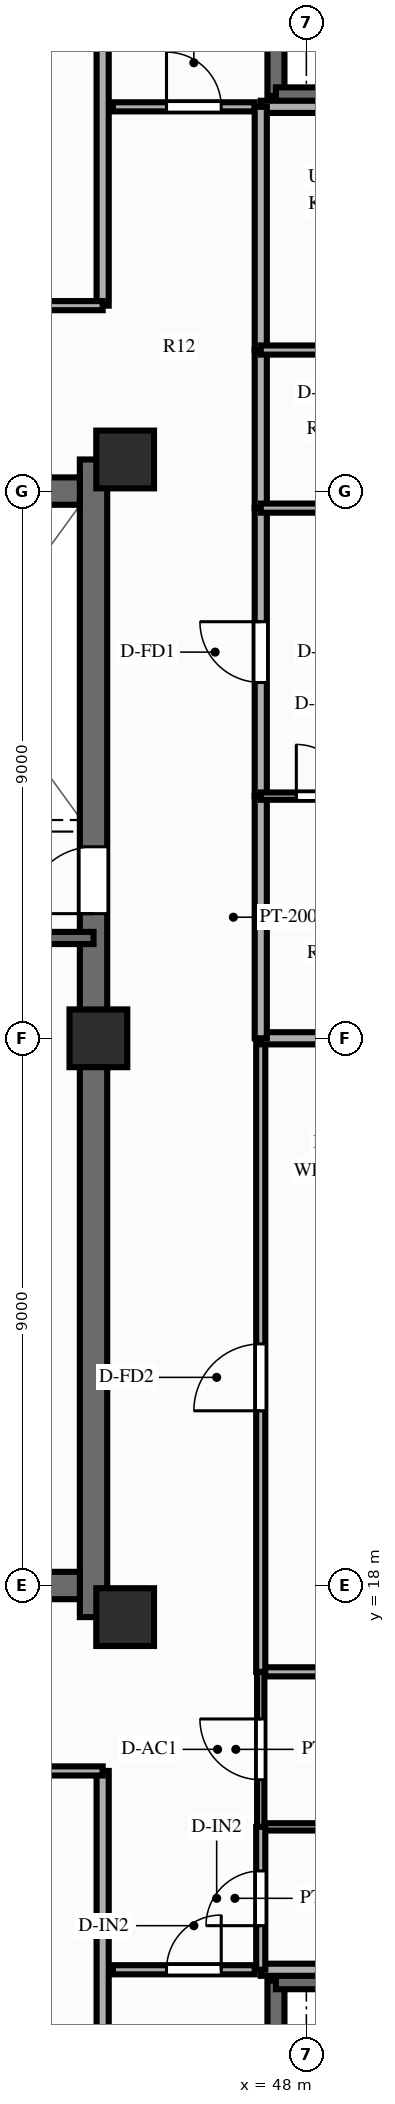
"""IFC4 building model, lengths in metres.
Left out: names, types, materials, properties, quantities, classifications, styles, units other than length and angle.
Written with IfcOpenShell. Run it as: python <this file> out.ifc"""

import sys

from ifc_helpers import new_model, si_unit, direction, frame, frame_2d, origin, origin_2d, place, context, subcontext, project, spatial, rectangle, extrude, source, transform, mapped, element, fill, save


model = new_model("IFC4")
c1 = context("Model", 3, precision=1e-05, world=origin(), true_north=direction((0.0, 1.0)))
c2 = subcontext(c1, "Body", "Model", "MODEL_VIEW")
j1 = project(units=[si_unit("LENGTHUNIT", "METRE"), si_unit("PLANEANGLEUNIT", "RADIAN")], contexts=[c1])
p1 = place(None, origin())
s1 = spatial("IfcSite", under=j1, at=p1, CompositionType="ELEMENT")
p2 = place(p1, origin())
s2 = spatial("IfcBuilding", under=s1, at=p2, CompositionType="ELEMENT")
p3 = place(p2, frame((0.0, 0.0, 249.0)))
s3 = spatial("IfcBuildingStorey", under=s2, at=p3, CompositionType="ELEMENT", Elevation=249.0)
p4 = place(p3, frame((44.5, 17.48, 0.0), z_axis=(0.0, 0.0, 1.0), x_axis=(0.0, 1.0, 0.0)))
e1 = element("IfcWall", 1, at=p4, inside=s3, PredefinedType="SHEAR", context=c2, shape_type="SweptSolid", body=[
    extrude(rectangle(XDim=19.04, YDim=0.45, at=frame_2d((9.52, 0.0))), origin(), (0.0, 0.0, 1.0), 3.2),
])
p5 = place(p4, frame((12.67, 0.0, 0.0), z_axis=(0.0, 0.0, 1.0), x_axis=(-1.0, 0.0, 0.0)))
e2 = element("IfcOpeningElement", 2, at=p5, cuts=e1, PredefinedType="OPENING", context=c2, shape_type="SweptSolid", body=[
    extrude(rectangle(XDim=1.1, YDim=2.15, at=frame_2d((0.55, 1.075))), frame((0.0, 0.237, 0.0), z_axis=(0.0, -1.0, 0.0), x_axis=(1.0, 0.0, 0.0)), (0.0, 0.0, 1.0), 0.474),
])
p6 = place(p3, frame((31.725, 18.0, 0.0), z_axis=(0.0, 0.0, 1.0), x_axis=(1.0, 0.0, 0.0)))
e3 = element("IfcWall", 3, at=p6, inside=s3, PredefinedType="SHEAR", context=c2, shape_type="SweptSolid", body=[
    extrude(rectangle(XDim=12.55, YDim=0.45, at=frame_2d((6.275, 0.0))), origin(), (0.0, 0.0, 1.0), 3.2),
])
p7 = place(p3, frame((31.725, 36.0, 0.0), z_axis=(0.0, 0.0, 1.0), x_axis=(1.0, 0.0, 0.0)))
e4 = element("IfcWall", 4, at=p7, inside=s3, PredefinedType="SHEAR", context=c2, shape_type="SweptSolid", body=[
    extrude(rectangle(XDim=12.55, YDim=0.45, at=frame_2d((6.275, 0.0))), origin(), (0.0, 0.0, 1.0), 3.2),
])
p8 = place(p7, frame((5.225, 0.0, 0.0), z_axis=(0.0, 0.0, 1.0), x_axis=(-1.0, 0.0, 0.0)))
e5 = element("IfcOpeningElement", 5, at=p8, cuts=e4, PredefinedType="OPENING", context=c2, shape_type="SweptSolid", body=[
    extrude(rectangle(XDim=1.4, YDim=2.15, at=frame_2d((0.7, 1.075))), frame((0.0, 0.237, 0.0), z_axis=(0.0, -1.0, 0.0), x_axis=(1.0, 0.0, 0.0)), (0.0, 0.0, 1.0), 0.474),
])
m1 = source(origin(), c2, "Body", "SweptSolid", [
    extrude(rectangle(XDim=0.95, YDim=0.95, at=origin_2d()), origin(), (0.0, 0.0, 1.0), 3.2),
])
for number, where, z_axis, x_axis in (
    (6, (45.02, 17.48, 0.0), (0.0, 0.0, 1.0), (1.0, 0.0, 0.0)),
    (7, (45.02, 36.52, 0.0), (0.0, 0.0, 1.0), (1.0, 0.0, 0.0)),
    (8, (44.58, 27.0, 0.0), (0.0, 0.0, 1.0), (1.0, 0.0, 0.0)),
):
    element("IfcColumn", number, at=place(p3, frame(where, z_axis=z_axis, x_axis=x_axis)), inside=s3, PredefinedType="COLUMN", context=c2, shape_type="MappedRepresentation", body=[
        mapped(m1, transform((0.0, 0.0, 0.0), scale=1.0)),
    ])
for number, where, z_axis, x_axis in (
    (9, (47.5, 6.08, 0.0), (0.0, 0.0, 1.0), (0.0, 1.0, 0.0)),
    (10, (47.5, 11.5, 0.0), (0.0, 0.0, 1.0), (1.0, 0.0, 0.0)),
    (11, (47.5, 42.5, 0.0), (0.0, 0.0, 1.0), (0.0, 1.0, 0.0)),
    (12, (47.5, 42.5, 0.0), (0.0, 0.0, 1.0), (1.0, 0.0, 0.0)),
):
    element("IfcWall", number, at=place(p3, frame(where, z_axis=z_axis, x_axis=x_axis)), inside=s3, PredefinedType="SOLIDWALL", context=c2, shape_type="SweptSolid", body=[
        extrude(rectangle(XDim=5.42, YDim=0.28, at=frame_2d((2.71, 0.0))), origin(), (0.0, 0.0, 1.0), 2.48),
    ])
p9 = place(p3, frame((40.57, 28.65, 0.0), z_axis=(0.0, 0.0, 1.0), x_axis=(1.0, 0.0, 0.0)))
e13 = element("IfcWall", 13, at=p9, inside=s3, PredefinedType="SOLIDWALL", context=c2, shape_type="SweptSolid", body=[
    extrude(rectangle(XDim=3.93, YDim=0.2, at=frame_2d((1.965, 0.0))), origin(), (0.0, 0.0, 1.0), 2.88),
])
p10 = place(p3, frame((44.82, 11.68, 0.0), z_axis=(0.0, 0.0, 1.0), x_axis=(1.0, 0.0, 0.0)))
e14 = element("IfcWall", 14, at=p10, inside=s3, PredefinedType="PARTITIONING", context=c2, shape_type="SweptSolid", body=[
    extrude(rectangle(XDim=2.33, YDim=0.15, at=frame_2d((1.165, 0.0))), origin(), (0.0, 0.0, 1.0), 2.88),
])
p11 = place(p10, frame((0.88, 0.0, 0.0)))
e15 = element("IfcOpeningElement", 15, at=p11, cuts=e14, PredefinedType="OPENING", context=c2, shape_type="SweptSolid", body=[
    extrude(rectangle(XDim=0.9, YDim=2.1, at=frame_2d((0.45, 1.05))), frame((0.0, 0.087, 0.0), z_axis=(0.0, -1.0, 0.0), x_axis=(1.0, 0.0, 0.0)), (0.0, 0.0, 1.0), 0.174),
])
p12 = place(p3, frame((44.82, 42.32, 0.0), z_axis=(0.0, 0.0, 1.0), x_axis=(1.0, 0.0, 0.0)))
e16 = element("IfcWall", 16, at=p12, inside=s3, PredefinedType="PARTITIONING", context=c2, shape_type="SweptSolid", body=[
    extrude(rectangle(XDim=2.33, YDim=0.15, at=frame_2d((1.165, 0.0))), origin(), (0.0, 0.0, 1.0), 2.88),
])
p13 = place(p12, frame((0.88, 0.0, 0.0)))
e17 = element("IfcOpeningElement", 17, at=p13, cuts=e16, PredefinedType="OPENING", context=c2, shape_type="SweptSolid", body=[
    extrude(rectangle(XDim=0.9, YDim=2.1, at=frame_2d((0.45, 1.05))), frame((0.0, 0.087, 0.0), z_axis=(0.0, -1.0, 0.0), x_axis=(1.0, 0.0, 0.0)), (0.0, 0.0, 1.0), 0.174),
])
p14 = place(p3, frame((44.65, 14.95, 0.0), z_axis=(0.0, 0.0, 1.0), x_axis=(0.0, -1.0, 0.0)))
e18 = element("IfcWall", 18, at=p14, inside=s3, PredefinedType="PARTITIONING", context=c2, shape_type="SweptSolid", body=[
    extrude(rectangle(XDim=8.8, YDim=0.2, at=frame_2d((4.4, 0.0))), origin(), (0.0, 0.0, 1.0), 2.59),
])
p15 = place(p3, frame((38.266, 14.95, 0.0), z_axis=(0.0, 0.0, 1.0), x_axis=(1.0, 0.0, 0.0)))
e19 = element("IfcWall", 19, at=p15, inside=s3, PredefinedType="PARTITIONING", context=c2, shape_type="SweptSolid", body=[
    extrude(rectangle(XDim=6.384, YDim=0.15, at=frame_2d((3.192, 0.0))), origin(), (0.0, 0.0, 1.0), 2.88),
])
p16 = place(p15, frame((2.642, 0.0, 0.0)))
e20 = element("IfcOpeningElement", 20, at=p16, cuts=e19, PredefinedType="OPENING", context=c2, shape_type="SweptSolid", body=[
    extrude(rectangle(XDim=1.1, YDim=2.15, at=frame_2d((0.55, 1.075))), frame((0.0, 0.087, 0.0), z_axis=(0.0, -1.0, 0.0), x_axis=(1.0, 0.0, 0.0)), (0.0, 0.0, 1.0), 0.174),
])
p17 = place(p3, frame((44.65, 39.05, 0.0), z_axis=(0.0, 0.0, 1.0), x_axis=(0.0, 1.0, 0.0)))
e21 = element("IfcWall", 21, at=p17, inside=s3, PredefinedType="PARTITIONING", context=c2, shape_type="SweptSolid", body=[
    extrude(rectangle(XDim=8.8, YDim=0.2, at=frame_2d((4.4, 0.0))), origin(), (0.0, 0.0, 1.0), 2.59),
])
p18 = place(p3, frame((38.852, 39.05, 0.0), z_axis=(0.0, 0.0, 1.0), x_axis=(1.0, 0.0, 0.0)))
e22 = element("IfcWall", 22, at=p18, inside=s3, PredefinedType="PARTITIONING", context=c2, shape_type="SweptSolid", body=[
    extrude(rectangle(XDim=5.798, YDim=0.15, at=frame_2d((2.899, 0.0))), origin(), (0.0, 0.0, 1.0), 2.88),
])
p19 = place(p18, frame((2.349, 0.0, 0.0)))
e23 = element("IfcOpeningElement", 23, at=p19, cuts=e22, PredefinedType="OPENING", context=c2, shape_type="SweptSolid", body=[
    extrude(rectangle(XDim=1.1, YDim=2.15, at=frame_2d((0.55, 1.075))), frame((0.0, 0.087, 0.0), z_axis=(0.0, -1.0, 0.0), x_axis=(1.0, 0.0, 0.0)), (0.0, 0.0, 1.0), 0.174),
])
for number, where, z_axis, x_axis in (
    (24, (47.25, 11.68, 0.0), (0.0, 0.0, 1.0), (1.0, 0.0, 0.0)),
    (25, (47.25, 42.32, 0.0), (0.0, 0.0, 1.0), (1.0, 0.0, 0.0)),
):
    element("IfcWall", number, at=place(p3, frame(where, z_axis=z_axis, x_axis=x_axis)), inside=s3, PredefinedType="PARTITIONING", context=c2, shape_type="SweptSolid", body=[
        extrude(rectangle(XDim=5.6, YDim=0.2, at=frame_2d((2.8, 0.0))), origin(), (0.0, 0.0, 1.0), 2.88),
    ])
p20 = place(p3, frame((47.25, 14.03, 0.0), z_axis=(0.0, 0.0, 1.0), x_axis=(1.0, 0.0, 0.0)))
e26 = element("IfcWall", 26, at=p20, inside=s3, PredefinedType="PARTITIONING", context=c2, shape_type="SweptSolid", body=[
    extrude(rectangle(XDim=3.6, YDim=0.12, at=frame_2d((1.8, 0.0))), origin(), (0.0, 0.0, 1.0), 2.88),
])
p21 = place(p3, frame((47.25, 16.58, 0.0), z_axis=(0.0, 0.0, 1.0), x_axis=(1.0, 0.0, 0.0)))
e27 = element("IfcWall", 27, at=p21, inside=s3, PredefinedType="PARTITIONING", context=c2, shape_type="SweptSolid", body=[
    extrude(rectangle(XDim=3.6, YDim=0.15, at=frame_2d((1.8, 0.0))), origin(), (0.0, 0.0, 1.0), 2.88),
])
p22 = place(p3, frame((47.25, 11.68, 0.0), z_axis=(0.0, 0.0, 1.0), x_axis=(0.0, 1.0, 0.0)))
e28 = element("IfcWall", 28, at=p22, inside=s3, PredefinedType="PARTITIONING", context=c2, shape_type="SweptSolid", body=[
    extrude(rectangle(XDim=2.35, YDim=0.15, at=frame_2d((1.175, 0.0))), origin(), (0.0, 0.0, 1.0), 2.88),
])
p23 = place(p22, frame((0.725, 0.0, 0.0)))
e29 = element("IfcOpeningElement", 29, at=p23, cuts=e28, PredefinedType="OPENING", context=c2, shape_type="SweptSolid", body=[
    extrude(rectangle(XDim=0.9, YDim=2.1, at=frame_2d((0.45, 1.05))), frame((0.0, 0.087, 0.0), z_axis=(0.0, -1.0, 0.0), x_axis=(1.0, 0.0, 0.0)), (0.0, 0.0, 1.0), 0.174),
])
p24 = place(p3, frame((47.25, 14.03, 0.0), z_axis=(0.0, 0.0, 1.0), x_axis=(0.0, 1.0, 0.0)))
e30 = element("IfcWall", 30, at=p24, inside=s3, PredefinedType="PARTITIONING", context=c2, shape_type="SweptSolid", body=[
    extrude(rectangle(XDim=2.55, YDim=0.12, at=frame_2d((1.275, 0.0))), origin(), (0.0, 0.0, 1.0), 2.88),
])
p25 = place(p24, frame((0.775, 0.0, 0.0)))
e31 = element("IfcOpeningElement", 31, at=p25, cuts=e30, PredefinedType="OPENING", context=c2, shape_type="SweptSolid", body=[
    extrude(rectangle(XDim=1.0, YDim=2.1, at=frame_2d((0.5, 1.05))), frame((0.0, 0.072, 0.0), z_axis=(0.0, -1.0, 0.0), x_axis=(1.0, 0.0, 0.0)), (0.0, 0.0, 1.0), 0.144),
])
p26 = place(p3, frame((47.25, 16.58, 0.0), z_axis=(0.0, 0.0, 1.0), x_axis=(0.0, 1.0, 0.0)))
e32 = element("IfcWall", 32, at=p26, inside=s3, PredefinedType="PARTITIONING", context=c2, shape_type="SweptSolid", body=[
    extrude(rectangle(XDim=10.42, YDim=0.15, at=frame_2d((5.21, 0.0))), origin(), (0.0, 0.0, 1.0), 2.88),
])
p27 = place(p26, frame((4.293, 0.0, 0.0)))
e33 = element("IfcOpeningElement", 33, at=p27, cuts=e32, PredefinedType="OPENING", context=c2, shape_type="SweptSolid", body=[
    extrude(rectangle(XDim=1.1, YDim=2.15, at=frame_2d((0.55, 1.075))), frame((0.0, 0.087, 0.0), z_axis=(0.0, -1.0, 0.0), x_axis=(1.0, 0.0, 0.0)), (0.0, 0.0, 1.0), 0.174),
])
p28 = place(p3, frame((47.25, 27.0, 0.0), z_axis=(0.0, 0.0, 1.0), x_axis=(1.0, 0.0, 0.0)))
e34 = element("IfcWall", 34, at=p28, inside=s3, PredefinedType="PARTITIONING", context=c2, shape_type="SweptSolid", body=[
    extrude(rectangle(XDim=5.6, YDim=0.2, at=frame_2d((2.8, 0.0))), origin(), (0.0, 0.0, 1.0), 2.88),
])
p29 = place(p3, frame((47.25, 27.0, 0.0), z_axis=(0.0, 0.0, 1.0), x_axis=(0.0, 1.0, 0.0)))
e35 = element("IfcWall", 35, at=p29, inside=s3, PredefinedType="PARTITIONING", context=c2, shape_type="SweptSolid", body=[
    extrude(rectangle(XDim=3.983, YDim=0.2, at=frame_2d((1.992, 0.0))), origin(), (0.0, 0.0, 1.0), 2.88),
])
p30 = place(p3, frame((47.25, 30.983, 0.0), z_axis=(0.0, 0.0, 1.0), x_axis=(0.0, 1.0, 0.0)))
e36 = element("IfcWall", 36, at=p30, inside=s3, PredefinedType="PARTITIONING", context=c2, shape_type="SweptSolid", body=[
    extrude(rectangle(XDim=4.737, YDim=0.2, at=frame_2d((2.368, 0.0))), origin(), (0.0, 0.0, 1.0), 2.88),
])
p31 = place(p30, frame((1.868, 0.0, 0.0)))
e37 = element("IfcOpeningElement", 37, at=p31, cuts=e36, PredefinedType="OPENING", context=c2, shape_type="SweptSolid", body=[
    extrude(rectangle(XDim=1.0, YDim=2.15, at=frame_2d((0.5, 1.075))), frame((0.0, 0.112, 0.0), z_axis=(0.0, -1.0, 0.0), x_axis=(1.0, 0.0, 0.0)), (0.0, 0.0, 1.0), 0.224),
])
p32 = place(p3, frame((47.25, 35.72, 0.0), z_axis=(0.0, 0.0, 1.0), x_axis=(0.0, 1.0, 0.0)))
e38 = element("IfcWall", 38, at=p32, inside=s3, PredefinedType="PARTITIONING", context=c2, shape_type="SweptSolid", body=[
    extrude(rectangle(XDim=2.6, YDim=0.2, at=frame_2d((1.3, 0.0))), origin(), (0.0, 0.0, 1.0), 2.88),
])
p33 = place(p3, frame((47.25, 35.72, 0.0), z_axis=(0.0, 0.0, 1.0), x_axis=(1.0, 0.0, 0.0)))
e39 = element("IfcWall", 39, at=p33, inside=s3, PredefinedType="PARTITIONING", context=c2, shape_type="SweptSolid", body=[
    extrude(rectangle(XDim=2.85, YDim=0.15, at=frame_2d((1.425, 0.0))), origin(), (0.0, 0.0, 1.0), 2.88),
])
p34 = place(p3, frame((47.25, 38.32, 0.0), z_axis=(0.0, 0.0, 1.0), x_axis=(0.0, 1.0, 0.0)))
e40 = element("IfcWall", 40, at=p34, inside=s3, PredefinedType="PARTITIONING", context=c2, shape_type="SweptSolid", body=[
    extrude(rectangle(XDim=4.0, YDim=0.2, at=frame_2d((2.0, 0.0))), origin(), (0.0, 0.0, 1.0), 2.88),
])
p35 = place(p3, frame((47.25, 30.983, 0.0), z_axis=(0.0, 0.0, 1.0), x_axis=(1.0, 0.0, 0.0)))
e41 = element("IfcWall", 41, at=p35, inside=s3, PredefinedType="PARTITIONING", context=c2, shape_type="SweptSolid", body=[
    extrude(rectangle(XDim=2.02, YDim=0.12, at=frame_2d((1.01, 0.0))), origin(), (0.0, 0.0, 1.0), 2.88),
])
p36 = place(p35, frame((0.585, 0.0, 0.0)))
e42 = element("IfcOpeningElement", 42, at=p36, cuts=e41, PredefinedType="OPENING", context=c2, shape_type="SweptSolid", body=[
    extrude(rectangle(XDim=0.85, YDim=2.05, at=frame_2d((0.425, 1.025))), frame((0.0, 0.072, 0.0), z_axis=(0.0, -1.0, 0.0), x_axis=(1.0, 0.0, 0.0)), (0.0, 0.0, 1.0), 0.144),
])
p37 = place(p3, frame((47.25, 38.32, 0.0), z_axis=(0.0, 0.0, 1.0), x_axis=(1.0, 0.0, 0.0)))
e43 = element("IfcWall", 43, at=p37, inside=s3, PredefinedType="PARTITIONING", context=c2, shape_type="SweptSolid", body=[
    extrude(rectangle(XDim=2.85, YDim=0.15, at=frame_2d((1.425, 0.0))), origin(), (0.0, 0.0, 1.0), 2.88),
])
p38 = place(p37, frame((0.975, 0.0, 0.0)))
e44 = element("IfcOpeningElement", 44, at=p38, cuts=e43, PredefinedType="OPENING", context=c2, shape_type="SweptSolid", body=[
    extrude(rectangle(XDim=0.9, YDim=2.1, at=frame_2d((0.45, 1.05))), frame((0.0, 0.087, 0.0), z_axis=(0.0, -1.0, 0.0), x_axis=(1.0, 0.0, 0.0)), (0.0, 0.0, 1.0), 0.174),
])
m2 = source(origin(), c2, "Body", "SweptSolid", [
    extrude(rectangle(XDim=1.1, YDim=2.15, at=frame_2d((0.55, 1.075))), frame((0.0, 0.025, 0.0), z_axis=(0.0, -1.0, 0.0), x_axis=(1.0, 0.0, 0.0)), (0.0, 0.0, 1.0), 0.05),
])
p39 = place(p5, origin())
e45 = element("IfcDoor", 45, at=p39, inside=s3, OperationType="SINGLE_SWING_RIGHT", PredefinedType="DOOR", context=c2, shape_type="MappedRepresentation", body=[
    mapped(m2, transform((0.0, 0.0, 0.0), scale=1.0)),
])
fill(e2, e45)
m3 = source(origin(), c2, "Body", "SweptSolid", [
    extrude(rectangle(XDim=0.9, YDim=2.1, at=frame_2d((0.45, 1.05))), frame((0.0, 0.025, 0.0), z_axis=(0.0, -1.0, 0.0), x_axis=(1.0, 0.0, 0.0)), (0.0, 0.0, 1.0), 0.05),
])
p40 = place(p11, origin())
e46 = element("IfcDoor", 46, at=p40, inside=s3, OperationType="SINGLE_SWING_RIGHT", PredefinedType="DOOR", context=c2, shape_type="MappedRepresentation", body=[
    mapped(m3, transform((0.0, 0.0, 0.0), scale=1.0)),
])
fill(e15, e46)
p41 = place(p13, origin())
e47 = element("IfcDoor", 47, at=p41, inside=s3, OperationType="SINGLE_SWING_LEFT", PredefinedType="DOOR", context=c2, shape_type="MappedRepresentation", body=[
    mapped(m3, transform((0.0, 0.0, 0.0), scale=1.0)),
])
fill(e17, e47)
p42 = place(p23, origin())
e48 = element("IfcDoor", 48, at=p42, inside=s3, OperationType="SINGLE_SWING_LEFT", PredefinedType="DOOR", context=c2, shape_type="MappedRepresentation", body=[
    mapped(m3, transform((0.0, 0.0, 0.0), scale=1.0)),
])
fill(e29, e48)
m4 = source(origin(), c2, "Body", "SweptSolid", [
    extrude(rectangle(XDim=1.0, YDim=2.1, at=frame_2d((0.5, 1.05))), frame((0.0, 0.025, 0.0), z_axis=(0.0, -1.0, 0.0), x_axis=(1.0, 0.0, 0.0)), (0.0, 0.0, 1.0), 0.05),
])
p43 = place(p25, origin())
e49 = element("IfcDoor", 49, at=p43, inside=s3, OperationType="SINGLE_SWING_RIGHT", PredefinedType="DOOR", context=c2, shape_type="MappedRepresentation", body=[
    mapped(m4, transform((0.0, 0.0, 0.0), scale=1.0)),
])
fill(e31, e49)
p44 = place(p27, origin())
e50 = element("IfcDoor", 50, at=p44, inside=s3, OperationType="SINGLE_SWING_LEFT", PredefinedType="DOOR", context=c2, shape_type="MappedRepresentation", body=[
    mapped(m2, transform((0.0, 0.0, 0.0), scale=1.0)),
])
fill(e33, e50)
m5 = source(origin(), c2, "Body", "SweptSolid", [
    extrude(rectangle(XDim=1.0, YDim=2.15, at=frame_2d((0.5, 1.075))), frame((0.0, 0.025, 0.0), z_axis=(0.0, -1.0, 0.0), x_axis=(1.0, 0.0, 0.0)), (0.0, 0.0, 1.0), 0.05),
])
p45 = place(p31, origin())
e51 = element("IfcDoor", 51, at=p45, inside=s3, OperationType="SINGLE_SWING_RIGHT", PredefinedType="DOOR", context=c2, shape_type="MappedRepresentation", body=[
    mapped(m5, transform((0.0, 0.0, 0.0), scale=1.0)),
])
fill(e37, e51)
m6 = source(origin(), c2, "Body", "SweptSolid", [
    extrude(rectangle(XDim=0.85, YDim=2.05, at=frame_2d((0.425, 1.025))), frame((0.0, 0.025, 0.0), z_axis=(0.0, -1.0, 0.0), x_axis=(1.0, 0.0, 0.0)), (0.0, 0.0, 1.0), 0.05),
])
p46 = place(p36, origin())
e52 = element("IfcDoor", 52, at=p46, inside=s3, OperationType="SINGLE_SWING_LEFT", PredefinedType="DOOR", context=c2, shape_type="MappedRepresentation", body=[
    mapped(m6, transform((0.0, 0.0, 0.0), scale=1.0)),
])
fill(e42, e52)
save(model, sys.argv[1])
